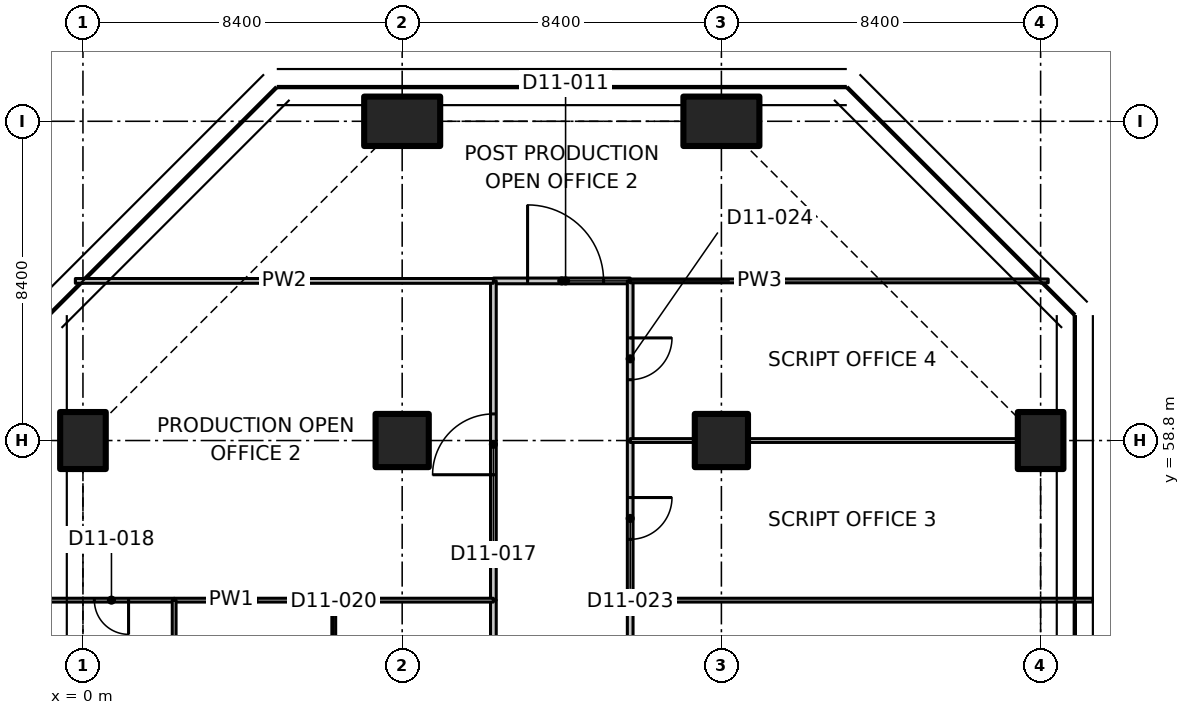
"""IFC4 building model, lengths in metres.
Left out: names, types, materials, properties, quantities, classifications, styles, units other than length and angle.
Written with IfcOpenShell. Run it as: python <this file> out.ifc"""

import sys

from ifc_helpers import new_model, si_unit, direction, frame, frame_2d, origin, origin_2d, place, context, subcontext, project, spatial, polyline, rectangle, outline, extrude, element, fill, save


model = new_model("IFC4")
c1 = context("Model", 3, precision=1e-05, world=origin(), true_north=direction((0.0, 1.0)))
c2 = subcontext(c1, "Body", "Model", "MODEL_VIEW")
j1 = project(units=[si_unit("LENGTHUNIT", "METRE"), si_unit("PLANEANGLEUNIT", "RADIAN")], contexts=[c1])
p1 = place(None, origin())
s1 = spatial("IfcSite", under=j1, at=p1, CompositionType="ELEMENT")
p2 = place(p1, origin())
s2 = spatial("IfcBuilding", under=s1, at=p2, CompositionType="ELEMENT")
p3 = place(p2, frame((0.0, 0.0, 83.3)))
s3 = spatial("IfcBuildingStorey", under=s2, at=p3, CompositionType="ELEMENT", Elevation=83.3)
p4 = place(p3, frame((0.0, 58.8, 0.0), z_axis=(0.0, 0.0, 1.0), x_axis=(1.0, 0.0, 0.0)))
e1 = element("IfcColumn", 1, at=p4, inside=s3, PredefinedType="COLUMN", context=c2, shape_type="SweptSolid", body=[
    extrude(rectangle(XDim=1.2, YDim=1.5, at=origin_2d()), origin(), (0.0, 0.0, 1.0), 3.3),
])
p5 = place(p3, frame((8.4, 58.8, 0.0), z_axis=(0.0, 0.0, 1.0), x_axis=(1.0, 0.0, 0.0)))
e2 = element("IfcColumn", 2, at=p5, inside=s3, PredefinedType="COLUMN", context=c2, shape_type="SweptSolid", body=[
    extrude(rectangle(XDim=1.4, YDim=1.4, at=origin_2d()), origin(), (0.0, 0.0, 1.0), 3.3),
])
p6 = place(p3, frame((8.4, 67.2, 0.0), z_axis=(0.0, 0.0, 1.0), x_axis=(0.0, 1.0, 0.0)))
e3 = element("IfcColumn", 3, at=p6, inside=s3, PredefinedType="COLUMN", context=c2, shape_type="SweptSolid", body=[
    extrude(rectangle(XDim=1.3, YDim=2.0, at=origin_2d()), origin(), (0.0, 0.0, 1.0), 3.3),
])
p7 = place(p3, frame((16.8, 58.8, 0.0), z_axis=(0.0, 0.0, 1.0), x_axis=(1.0, 0.0, 0.0)))
e4 = element("IfcColumn", 4, at=p7, inside=s3, PredefinedType="COLUMN", context=c2, shape_type="SweptSolid", body=[
    extrude(rectangle(XDim=1.4, YDim=1.4, at=origin_2d()), origin(), (0.0, 0.0, 1.0), 3.3),
])
p8 = place(p3, frame((16.8, 67.2, 0.0), z_axis=(0.0, 0.0, 1.0), x_axis=(0.0, 1.0, 0.0)))
e5 = element("IfcColumn", 5, at=p8, inside=s3, PredefinedType="COLUMN", context=c2, shape_type="SweptSolid", body=[
    extrude(rectangle(XDim=1.3, YDim=2.0, at=origin_2d()), origin(), (0.0, 0.0, 1.0), 3.3),
])
p9 = place(p3, frame((25.2, 58.8, 0.0), z_axis=(0.0, 0.0, 1.0), x_axis=(1.0, 0.0, 0.0)))
e6 = element("IfcColumn", 6, at=p9, inside=s3, PredefinedType="COLUMN", context=c2, shape_type="SweptSolid", body=[
    extrude(rectangle(XDim=1.2, YDim=1.5, at=origin_2d()), origin(), (0.0, 0.0, 1.0), 3.3),
])
p10 = place(p3, frame((10.8, 63.0, 0.0), z_axis=(0.0, 0.0, 1.0), x_axis=(1.0, 0.0, 0.0)))
e7 = element("IfcWall", 7, at=p10, inside=s3, PredefinedType="PARTITIONING", context=c2, shape_type="SweptSolid", body=[
    extrude(rectangle(XDim=3.6, YDim=0.15, at=frame_2d((1.8, 0.0))), origin(), (0.0, 0.0, 1.0), 3.28),
])
p11 = place(p10, frame((0.9, 0.0, 0.0)))
e8 = element("IfcOpeningElement", 8, at=p11, cuts=e7, PredefinedType="OPENING", context=c2, shape_type="SweptSolid", body=[
    extrude(rectangle(XDim=2.0, YDim=2.4, at=frame_2d((1.0, 1.2))), frame((0.0, 0.085, 0.0), z_axis=(0.0, -1.0, 0.0), x_axis=(1.0, 0.0, 0.0)), (0.0, 0.0, 1.0), 0.17),
])
p12 = place(p3, frame((10.8, 54.6, 0.0), z_axis=(0.0, 0.0, 1.0), x_axis=(0.0, 1.0, 0.0)))
e9 = element("IfcWall", 9, at=p12, inside=s3, PredefinedType="PARTITIONING", context=c2, shape_type="SweptSolid", body=[
    extrude(rectangle(XDim=8.4, YDim=0.15, at=frame_2d((4.2, 0.0))), origin(), (0.0, 0.0, 1.0), 3.28),
])
p13 = place(p12, frame((3.3, 0.0, 0.0)))
e10 = element("IfcOpeningElement", 10, at=p13, cuts=e9, PredefinedType="OPENING", context=c2, shape_type="SweptSolid", body=[
    extrude(rectangle(XDim=1.6, YDim=2.1, at=frame_2d((0.8, 1.05))), frame((0.0, 0.085, 0.0), z_axis=(0.0, -1.0, 0.0), x_axis=(1.0, 0.0, 0.0)), (0.0, 0.0, 1.0), 0.17),
])
p14 = place(p3, frame((10.8, 50.4, 0.0), z_axis=(0.0, 0.0, 1.0), x_axis=(0.0, 1.0, 0.0)))
e11 = element("IfcWall", 11, at=p14, inside=s3, PredefinedType="PARTITIONING", context=c2, shape_type="SweptSolid", body=[
    extrude(rectangle(XDim=4.2, YDim=0.15, at=frame_2d((2.1, 0.0))), origin(), (0.0, 0.0, 1.0), 3.28),
])
p15 = place(p3, frame((14.4, 54.6, 0.0), z_axis=(0.0, 0.0, 1.0), x_axis=(0.0, -1.0, 0.0)))
e12 = element("IfcWall", 12, at=p15, inside=s3, PredefinedType="PARTITIONING", context=c2, shape_type="SweptSolid", body=[
    extrude(rectangle(XDim=16.8, YDim=0.15, at=frame_2d((8.4, 0.0))), origin(), (0.0, 0.0, 1.0), 3.28),
])
p16 = place(p15, frame((7.5, 0.0, 0.0)))
e13 = element("IfcOpeningElement", 13, at=p16, cuts=e12, PredefinedType="OPENING", context=c2, shape_type="SweptSolid", body=[
    extrude(rectangle(XDim=2.0, YDim=2.4, at=frame_2d((1.0, 1.2))), frame((0.0, 0.085, 0.0), z_axis=(0.0, -1.0, 0.0), x_axis=(1.0, 0.0, 0.0)), (0.0, 0.0, 1.0), 0.17),
])
p17 = place(p3, frame((14.4, 58.8, 0.0), z_axis=(0.0, 0.0, 1.0), x_axis=(0.0, -1.0, 0.0)))
e14 = element("IfcWall", 14, at=p17, inside=s3, PredefinedType="PARTITIONING", context=c2, shape_type="SweptSolid", body=[
    extrude(rectangle(XDim=4.2, YDim=0.15, at=frame_2d((2.1, 0.0))), origin(), (0.0, 0.0, 1.0), 3.28),
])
p18 = place(p17, frame((1.5, 0.0, 0.0)))
e15 = element("IfcOpeningElement", 15, at=p18, cuts=e14, PredefinedType="OPENING", context=c2, shape_type="SweptSolid", body=[
    extrude(rectangle(XDim=1.1, YDim=2.1, at=frame_2d((0.55, 1.05))), frame((0.0, 0.085, 0.0), z_axis=(0.0, -1.0, 0.0), x_axis=(1.0, 0.0, 0.0)), (0.0, 0.0, 1.0), 0.17),
])
p19 = place(p3, frame((14.4, 63.0, 0.0), z_axis=(0.0, 0.0, 1.0), x_axis=(0.0, -1.0, 0.0)))
e16 = element("IfcWall", 16, at=p19, inside=s3, PredefinedType="PARTITIONING", context=c2, shape_type="SweptSolid", body=[
    extrude(rectangle(XDim=4.2, YDim=0.15, at=frame_2d((2.1, 0.0))), origin(), (0.0, 0.0, 1.0), 3.28),
])
p20 = place(p19, frame((1.5, 0.0, 0.0)))
e17 = element("IfcOpeningElement", 17, at=p20, cuts=e16, PredefinedType="OPENING", context=c2, shape_type="SweptSolid", body=[
    extrude(rectangle(XDim=1.1, YDim=2.1, at=frame_2d((0.55, 1.05))), frame((0.0, 0.085, 0.0), z_axis=(0.0, -1.0, 0.0), x_axis=(1.0, 0.0, 0.0)), (0.0, 0.0, 1.0), 0.17),
])
p21 = place(p3, frame((10.8, 63.0, 0.0), z_axis=(0.0, 0.0, 1.0), x_axis=(-1.0, 0.0, 0.0)))
e18 = element("IfcWall", 18, at=p21, inside=s3, PredefinedType="PARTITIONING", context=c2, shape_type="SweptSolid", body=[
    extrude(outline(polyline([(0.0, 0.0), (11.0, 0.0), (11.0, 3.28), (7.278, 3.28), (7.276, 2.93), (5.924, 2.93), (5.922, 3.28), (0.0, 3.28), (0.0, 0.0)])), frame((0.0, 0.062, 0.0), z_axis=(0.0, -1.0, 0.0), x_axis=(1.0, 0.0, 0.0)), (0.0, 0.0, 1.0), 0.125),
])
p22 = place(p3, frame((25.4, 63.0, 0.0), z_axis=(0.0, 0.0, 1.0), x_axis=(-1.0, 0.0, 0.0)))
e19 = element("IfcWall", 19, at=p22, inside=s3, PredefinedType="PARTITIONING", context=c2, shape_type="SweptSolid", body=[
    extrude(outline(polyline([(0.0, 0.0), (11.0, 0.0), (11.0, 3.28), (5.066, 3.28), (5.064, 2.93), (3.736, 2.93), (3.734, 3.28), (0.0, 3.28), (0.0, 0.0)])), frame((0.0, 0.05, 0.0), z_axis=(0.0, -1.0, 0.0), x_axis=(1.0, 0.0, 0.0)), (0.0, 0.0, 1.0), 0.1),
])
p23 = place(p3, frame((2.4, 54.6, 0.0), z_axis=(0.0, 0.0, 1.0), x_axis=(-1.0, 0.0, 0.0)))
e20 = element("IfcWall", 20, at=p23, inside=s3, PredefinedType="PARTITIONING", context=c2, shape_type="SweptSolid", body=[
    extrude(rectangle(XDim=3.765, YDim=0.1, at=frame_2d((1.882, 0.0))), origin(), (0.0, 0.0, 1.0), 2.93),
])
p24 = place(p23, frame((1.2, 0.0, 0.0)))
e21 = element("IfcOpeningElement", 21, at=p24, cuts=e20, PredefinedType="OPENING", context=c2, shape_type="SweptSolid", body=[
    extrude(rectangle(XDim=0.9, YDim=2.1, at=frame_2d((0.45, 1.05))), frame((0.0, 0.06, 0.0), z_axis=(0.0, -1.0, 0.0), x_axis=(1.0, 0.0, 0.0)), (0.0, 0.0, 1.0), 0.12),
])
p25 = place(p3, frame((6.6, 54.6, 0.0), z_axis=(0.0, 0.0, 1.0), x_axis=(-1.0, 0.0, 0.0)))
e22 = element("IfcWall", 22, at=p25, inside=s3, PredefinedType="PARTITIONING", context=c2, shape_type="SweptSolid", body=[
    extrude(rectangle(XDim=4.2, YDim=0.1, at=frame_2d((2.1, 0.0))), origin(), (0.0, 0.0, 1.0), 3.28),
])
p26 = place(p3, frame((10.8, 54.6, 0.0), z_axis=(0.0, 0.0, 1.0), x_axis=(-1.0, 0.0, 0.0)))
e23 = element("IfcWall", 23, at=p26, inside=s3, PredefinedType="PARTITIONING", context=c2, shape_type="SweptSolid", body=[
    extrude(rectangle(XDim=4.2, YDim=0.1, at=frame_2d((2.1, 0.0))), origin(), (0.0, 0.0, 1.0), 3.28),
])
p27 = place(p3, frame((2.4, 54.6, 0.0), z_axis=(0.0, 0.0, 1.0), x_axis=(0.0, -1.0, 0.0)))
e24 = element("IfcWall", 24, at=p27, inside=s3, PredefinedType="PARTITIONING", context=c2, shape_type="SweptSolid", body=[
    extrude(rectangle(XDim=4.2, YDim=0.1, at=frame_2d((2.1, 0.0))), origin(), (0.0, 0.0, 1.0), 3.28),
])
p28 = place(p27, frame((1.8, 0.0, 0.0)))
e25 = element("IfcOpeningElement", 25, at=p28, cuts=e24, PredefinedType="OPENING", context=c2, shape_type="SweptSolid", body=[
    extrude(rectangle(XDim=0.9, YDim=2.1, at=frame_2d((0.45, 1.05))), frame((0.0, 0.06, 0.0), z_axis=(0.0, -1.0, 0.0), x_axis=(1.0, 0.0, 0.0)), (0.0, 0.0, 1.0), 0.12),
])
p29 = place(p3, frame((6.6, 54.6, 0.0), z_axis=(0.0, 0.0, 1.0), x_axis=(0.0, -1.0, 0.0)))
e26 = element("IfcWall", 26, at=p29, inside=s3, PredefinedType="PARTITIONING", context=c2, shape_type="SweptSolid", body=[
    extrude(rectangle(XDim=4.2, YDim=0.1, at=frame_2d((2.1, 0.0))), origin(), (0.0, 0.0, 1.0), 3.28),
])
p30 = place(p29, frame((1.8, 0.0, 0.0)))
e27 = element("IfcOpeningElement", 27, at=p30, cuts=e26, PredefinedType="OPENING", context=c2, shape_type="SweptSolid", body=[
    extrude(rectangle(XDim=0.9, YDim=2.1, at=frame_2d((0.45, 1.05))), frame((0.0, 0.06, 0.0), z_axis=(0.0, -1.0, 0.0), x_axis=(1.0, 0.0, 0.0)), (0.0, 0.0, 1.0), 0.12),
])
p31 = place(p3, frame((14.4, 54.6, 0.0), z_axis=(0.0, 0.0, 1.0), x_axis=(1.0, 0.0, 0.0)))
e28 = element("IfcWall", 28, at=p31, inside=s3, PredefinedType="PARTITIONING", context=c2, shape_type="SweptSolid", body=[
    extrude(outline(polyline([(0.0, 0.0), (12.165, 0.0), (12.165, 3.28), (11.9, 3.28), (11.25, 3.28), (11.248, 2.93), (10.352, 2.93), (10.35, 3.28), (0.0, 3.28), (0.0, 0.0)])), frame((0.0, 0.05, 0.0), z_axis=(0.0, -1.0, 0.0), x_axis=(1.0, 0.0, 0.0)), (0.0, 0.0, 1.0), 0.1),
])
p32 = place(p3, frame((14.4, 58.8, 0.0), z_axis=(0.0, 0.0, 1.0), x_axis=(1.0, 0.0, 0.0)))
e29 = element("IfcWall", 29, at=p32, inside=s3, PredefinedType="PARTITIONING", context=c2, shape_type="SweptSolid", body=[
    extrude(rectangle(XDim=1.68, YDim=0.1, at=frame_2d((0.84, 0.0))), origin(), (0.0, 0.0, 1.0), 3.28),
])
p33 = place(p3, frame((17.52, 58.8, 0.0), z_axis=(0.0, 0.0, 1.0), x_axis=(1.0, 0.0, 0.0)))
e30 = element("IfcWall", 30, at=p33, inside=s3, PredefinedType="PARTITIONING", context=c2, shape_type="SweptSolid", body=[
    extrude(rectangle(XDim=7.06, YDim=0.1, at=frame_2d((3.53, 0.0))), origin(), (0.0, 0.0, 1.0), 3.28),
])
p34 = place(p11, origin())
e31 = element("IfcDoor", 31, at=p34, inside=s3, OperationType="DOUBLE_DOOR_SINGLE_SWING", PredefinedType="DOOR", context=c2, shape_type="SweptSolid", body=[
    extrude(rectangle(XDim=2.0, YDim=2.4, at=frame_2d((1.0, 1.2))), frame((0.0, 0.025, 0.0), z_axis=(0.0, -1.0, 0.0), x_axis=(1.0, 0.0, 0.0)), (0.0, 0.0, 1.0), 0.05),
])
fill(e8, e31)
p35 = place(p13, origin())
e32 = element("IfcDoor", 32, at=p35, inside=s3, OperationType="DOUBLE_DOOR_SINGLE_SWING", PredefinedType="DOOR", context=c2, shape_type="SweptSolid", body=[
    extrude(rectangle(XDim=1.6, YDim=2.1, at=frame_2d((0.8, 1.05))), frame((0.0, 0.025, 0.0), z_axis=(0.0, -1.0, 0.0), x_axis=(1.0, 0.0, 0.0)), (0.0, 0.0, 1.0), 0.05),
])
fill(e10, e32)
p36 = place(p24, origin())
e33 = element("IfcDoor", 33, at=p36, inside=s3, OperationType="SINGLE_SWING_LEFT", PredefinedType="DOOR", context=c2, shape_type="SweptSolid", body=[
    extrude(rectangle(XDim=0.9, YDim=2.1, at=frame_2d((0.45, 1.05))), frame((0.0, 0.025, 0.0), z_axis=(0.0, -1.0, 0.0), x_axis=(1.0, 0.0, 0.0)), (0.0, 0.0, 1.0), 0.05),
])
fill(e21, e33)
p37 = place(p18, origin())
e34 = element("IfcDoor", 34, at=p37, inside=s3, OperationType="SINGLE_SWING_LEFT", PredefinedType="DOOR", context=c2, shape_type="SweptSolid", body=[
    extrude(rectangle(XDim=1.1, YDim=2.1, at=frame_2d((0.55, 1.05))), frame((0.0, 0.025, 0.0), z_axis=(0.0, -1.0, 0.0), x_axis=(1.0, 0.0, 0.0)), (0.0, 0.0, 1.0), 0.05),
])
fill(e15, e34)
p38 = place(p20, origin())
e35 = element("IfcDoor", 35, at=p38, inside=s3, OperationType="SINGLE_SWING_LEFT", PredefinedType="DOOR", context=c2, shape_type="SweptSolid", body=[
    extrude(rectangle(XDim=1.1, YDim=2.1, at=frame_2d((0.55, 1.05))), frame((0.0, 0.025, 0.0), z_axis=(0.0, -1.0, 0.0), x_axis=(1.0, 0.0, 0.0)), (0.0, 0.0, 1.0), 0.05),
])
fill(e17, e35)
save(model, sys.argv[1])
